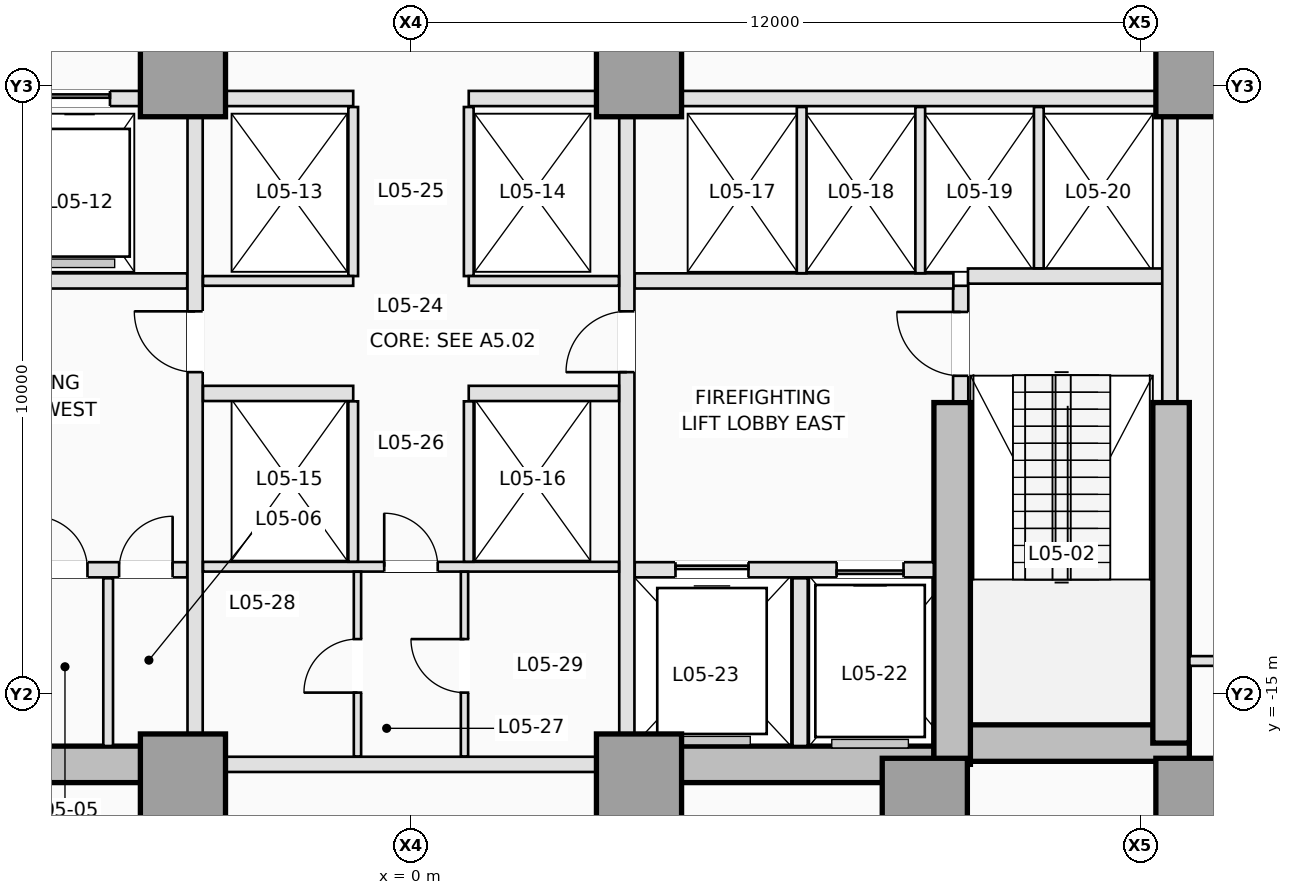
"""IFC4 building model, lengths in metres.
Left out: names, types, materials, properties, quantities, classifications, styles, units other than length and angle.
Written with IfcOpenShell. Run it as: python <this file> out.ifc"""

import sys

from ifc_helpers import new_model, si_unit, direction, frame, frame_2d, origin, origin_2d, place, context, subcontext, project, spatial, rectangle, extrude, element, fill, save


model = new_model("IFC4")
c1 = context("Model", 3, precision=1e-05, world=origin(), true_north=direction((0.0, 1.0)))
c2 = subcontext(c1, "Body", "Model", "MODEL_VIEW")
j1 = project(units=[si_unit("LENGTHUNIT", "METRE"), si_unit("PLANEANGLEUNIT", "RADIAN")], contexts=[c1])
p1 = place(None, origin())
s1 = spatial("IfcSite", under=j1, at=p1, CompositionType="ELEMENT")
p2 = place(p1, origin())
s2 = spatial("IfcBuilding", under=s1, at=p2, CompositionType="ELEMENT")
p3 = place(p2, frame((0.0, 0.0, 23.0)))
s3 = spatial("IfcBuildingStorey", under=s2, at=p3, CompositionType="ELEMENT", Elevation=23.0)
for number, where, z_axis, x_axis in (
    (1, (-8.9, -16.15, 0.0), (0.0, 0.0, 1.0), (1.0, 0.0, 0.0)),
    (2, (3.75, -16.15, 0.0), (0.0, 0.0, 1.0), (1.0, 0.0, 0.0)),
):
    element("IfcWall", number, at=place(p3, frame(where, z_axis=z_axis, x_axis=x_axis)), inside=s3, PredefinedType="SHEAR", context=c2, shape_type="SweptSolid", body=[
        extrude(rectangle(XDim=5.15, YDim=0.6, at=frame_2d((2.575, 0.0))), origin(), (0.0, 0.0, 1.0), 4.6),
    ])
p4 = place(p3, frame((8.6, -15.8, 0.0), z_axis=(0.0, 0.0, 1.0), x_axis=(1.0, 0.0, 0.0)))
e3 = element("IfcWall", 3, at=p4, inside=s3, PredefinedType="SHEAR", context=c2, shape_type="SweptSolid", body=[
    extrude(rectangle(XDim=4.2, YDim=0.6, at=frame_2d((2.1, 0.0))), origin(), (0.0, 0.0, 1.0), 4.6),
])
p5 = place(p3, frame((12.5, -15.8, 0.0), z_axis=(0.0, 0.0, 1.0), x_axis=(0.0, 1.0, 0.0)))
e4 = element("IfcWall", 4, at=p5, inside=s3, PredefinedType="SHEAR", context=c2, shape_type="SweptSolid", body=[
    extrude(rectangle(XDim=5.6, YDim=0.6, at=frame_2d((2.8, 0.0))), origin(), (0.0, 0.0, 1.0), 4.6),
])
p6 = place(p3, frame((8.9, -16.15, 0.0), z_axis=(0.0, 0.0, 1.0), x_axis=(0.0, 1.0, 0.0)))
e5 = element("IfcWall", 5, at=p6, inside=s3, PredefinedType="SHEAR", context=c2, shape_type="SweptSolid", body=[
    extrude(rectangle(XDim=5.95, YDim=0.6, at=frame_2d((2.975, 0.0))), origin(), (0.0, 0.0, 1.0), 4.6),
])
for number, where, z_axis, x_axis in (
    (6, (-3.75, -16.35, 0.0), (0.0, 0.0, 1.0), (1.0, 0.0, 0.0)),
    (7, (3.75, -16.35, 0.0), (0.0, 0.0, 1.0), (1.0, 0.0, 0.0)),
    (8, (8.45, -16.75, 0.0), (0.0, 0.0, 1.0), (1.0, 0.0, 0.0)),
    (9, (12.95, -16.75, 0.0), (0.0, 0.0, 1.0), (1.0, 0.0, 0.0)),
    (10, (-3.75, -4.8, 0.0), (0.0, 0.0, 1.0), (1.0, 0.0, 0.0)),
    (11, (3.75, -4.8, 0.0), (0.0, 0.0, 1.0), (1.0, 0.0, 0.0)),
    (12, (12.95, -4.8, 0.0), (0.0, 0.0, 1.0), (1.0, 0.0, 0.0)),
):
    element("IfcColumn", number, at=place(p3, frame(where, z_axis=z_axis, x_axis=x_axis)), inside=s3, PredefinedType="COLUMN", context=c2, shape_type="SweptSolid", body=[
        extrude(rectangle(XDim=1.4, YDim=1.4, at=origin_2d()), origin(), (0.0, 0.0, 1.0), 4.6),
    ])
p7 = place(p3, frame((9.04, -10.18, 0.0), z_axis=(0.0, 0.0, 1.0), x_axis=(0.0, 1.0, 0.0)))
e13 = element("IfcWall", 13, at=p7, inside=s3, PredefinedType="PARTITIONING", context=c2, shape_type="SweptSolid", body=[
    extrude(rectangle(XDim=1.9, YDim=0.25, at=frame_2d((0.95, 0.0))), origin(), (0.0, 0.0, 1.0), 4.35),
])
p8 = place(p7, frame((0.42, 0.0, 0.0)))
e14 = element("IfcOpeningElement", 14, at=p8, cuts=e13, PredefinedType="OPENING", context=c2, shape_type="SweptSolid", body=[
    extrude(rectangle(XDim=1.05, YDim=2.15, at=frame_2d((0.525, 1.075))), frame((0.0, 0.135, 0.0), z_axis=(0.0, -1.0, 0.0), x_axis=(1.0, 0.0, 0.0)), (0.0, 0.0, 1.0), 0.27),
])
p9 = place(p3, frame((9.16, -8.12, 0.0), z_axis=(0.0, 0.0, 1.0), x_axis=(1.0, 0.0, 0.0)))
e15 = element("IfcWall", 15, at=p9, inside=s3, PredefinedType="PARTITIONING", context=c2, shape_type="SweptSolid", body=[
    extrude(rectangle(XDim=3.22, YDim=0.25, at=frame_2d((1.61, 0.0))), origin(), (0.0, 0.0, 1.0), 4.35),
])
p10 = place(p3, frame((12.48, -10.18, 0.0), z_axis=(0.0, 0.0, 1.0), x_axis=(0.0, 1.0, 0.0)))
e16 = element("IfcWall", 16, at=p10, inside=s3, PredefinedType="PARTITIONING", context=c2, shape_type="SweptSolid", body=[
    extrude(rectangle(XDim=4.678, YDim=0.25, at=frame_2d((2.339, 0.0))), origin(), (0.0, 0.0, 1.0), 4.35),
])
p11 = place(p3, frame((-8.598, -12.95, 0.0), z_axis=(0.0, 0.0, 1.0), x_axis=(1.0, 0.0, 0.0)))
e17 = element("IfcWall", 17, at=p11, inside=s3, PredefinedType="PARTITIONING", context=c2, shape_type="SweptSolid", body=[
    extrude(rectangle(XDim=4.918, YDim=0.25, at=frame_2d((2.459, 0.0))), origin(), (0.0, 0.0, 1.0), 4.35),
])
p12 = place(p11, frame((0.498, 0.0, 0.0)))
e18 = element("IfcOpeningElement", 18, at=p12, cuts=e17, PredefinedType="OPENING", context=c2, shape_type="SweptSolid", body=[
    extrude(rectangle(XDim=1.1, YDim=2.15, at=frame_2d((0.55, 1.075))), frame((0.0, 0.135, 0.0), z_axis=(0.0, -1.0, 0.0), x_axis=(1.0, 0.0, 0.0)), (0.0, 0.0, 1.0), 0.27),
])
p13 = place(p11, frame((2.398, 0.0, 0.0)))
e19 = element("IfcOpeningElement", 19, at=p13, cuts=e17, PredefinedType="OPENING", context=c2, shape_type="SweptSolid", body=[
    extrude(rectangle(XDim=0.88, YDim=2.1, at=frame_2d((0.44, 1.05))), frame((0.0, 0.135, 0.0), z_axis=(0.0, -1.0, 0.0), x_axis=(1.0, 0.0, 0.0)), (0.0, 0.0, 1.0), 0.27),
])
p14 = place(p11, frame((3.798, 0.0, 0.0)))
e20 = element("IfcOpeningElement", 20, at=p14, cuts=e17, PredefinedType="OPENING", context=c2, shape_type="SweptSolid", body=[
    extrude(rectangle(XDim=0.88, YDim=2.1, at=frame_2d((0.44, 1.05))), frame((0.0, 0.135, 0.0), z_axis=(0.0, -1.0, 0.0), x_axis=(1.0, 0.0, 0.0)), (0.0, 0.0, 1.0), 0.27),
])
p15 = place(p3, frame((3.68, -12.95, 0.0), z_axis=(0.0, 0.0, 1.0), x_axis=(1.0, 0.0, 0.0)))
e21 = element("IfcWall", 21, at=p15, inside=s3, PredefinedType="PARTITIONING", context=c2, shape_type="SweptSolid", body=[
    extrude(rectangle(XDim=4.918, YDim=0.25, at=frame_2d((2.459, 0.0))), origin(), (0.0, 0.0, 1.0), 4.35),
])
p16 = place(p15, frame((3.32, 0.0, 0.0)))
e22 = element("IfcOpeningElement", 22, at=p16, cuts=e21, PredefinedType="OPENING", context=c2, shape_type="SweptSolid", body=[
    extrude(rectangle(XDim=1.1, YDim=2.15, at=frame_2d((0.55, 1.075))), frame((0.0, 0.135, 0.0), z_axis=(0.0, -1.0, 0.0), x_axis=(1.0, 0.0, 0.0)), (0.0, 0.0, 1.0), 0.27),
])
p17 = place(p15, frame((0.67, 0.0, 0.0)))
e23 = element("IfcOpeningElement", 23, at=p17, cuts=e21, PredefinedType="OPENING", context=c2, shape_type="SweptSolid", body=[
    extrude(rectangle(XDim=1.2, YDim=2.15, at=frame_2d((0.6, 1.075))), frame((0.0, 0.135, 0.0), z_axis=(0.0, -1.0, 0.0), x_axis=(1.0, 0.0, 0.0)), (0.0, 0.0, 1.0), 0.27),
])
p18 = place(p3, frame((-4.98, -15.848, 0.0), z_axis=(0.0, 0.0, 1.0), x_axis=(0.0, 1.0, 0.0)))
e24 = element("IfcWall", 24, at=p18, inside=s3, PredefinedType="PARTITIONING", context=c2, shape_type="SweptSolid", body=[
    extrude(rectangle(XDim=2.758, YDim=0.16, at=frame_2d((1.379, 0.0))), origin(), (0.0, 0.0, 1.0), 4.35),
])
p19 = place(p3, frame((6.4, -15.848, 0.0), z_axis=(0.0, 0.0, 1.0), x_axis=(0.0, 1.0, 0.0)))
e25 = element("IfcWall", 25, at=p19, inside=s3, PredefinedType="PARTITIONING", context=c2, shape_type="SweptSolid", body=[
    extrude(rectangle(XDim=2.758, YDim=0.25, at=frame_2d((1.379, 0.0))), origin(), (0.0, 0.0, 1.0), 4.35),
])
for number, where, z_axis, x_axis in (
    (26, (-8.92, -8.2, 0.0), (0.0, 0.0, 1.0), (1.0, 0.0, 0.0)),
    (27, (3.68, -8.2, 0.0), (0.0, 0.0, 1.0), (1.0, 0.0, 0.0)),
):
    element("IfcWall", number, at=place(p3, frame(where, z_axis=z_axis, x_axis=x_axis)), inside=s3, PredefinedType="PARTITIONING", context=c2, shape_type="SweptSolid", body=[
        extrude(rectangle(XDim=5.24, YDim=0.25, at=frame_2d((2.62, 0.0))), origin(), (0.0, 0.0, 1.0), 4.35),
    ])
p20 = place(p3, frame((-3.55, -15.648, 0.0), z_axis=(0.0, 0.0, 1.0), x_axis=(0.0, 1.0, 0.0)))
e28 = element("IfcWall", 28, at=p20, inside=s3, PredefinedType="PARTITIONING", context=c2, shape_type="SweptSolid", body=[
    extrude(rectangle(XDim=10.146, YDim=0.25, at=frame_2d((5.073, 0.0))), origin(), (0.0, 0.0, 1.0), 4.35),
])
p21 = place(p20, frame((5.948, 0.0, 0.0)))
e29 = element("IfcOpeningElement", 29, at=p21, cuts=e28, PredefinedType="OPENING", context=c2, shape_type="SweptSolid", body=[
    extrude(rectangle(XDim=1.0, YDim=2.15, at=frame_2d((0.5, 1.075))), frame((0.0, 0.135, 0.0), z_axis=(0.0, -1.0, 0.0), x_axis=(1.0, 0.0, 0.0)), (0.0, 0.0, 1.0), 0.27),
])
p22 = place(p3, frame((3.55, -15.648, 0.0), z_axis=(0.0, 0.0, 1.0), x_axis=(0.0, 1.0, 0.0)))
e30 = element("IfcWall", 30, at=p22, inside=s3, PredefinedType="PARTITIONING", context=c2, shape_type="SweptSolid", body=[
    extrude(rectangle(XDim=10.146, YDim=0.25, at=frame_2d((5.073, 0.0))), origin(), (0.0, 0.0, 1.0), 4.35),
])
p23 = place(p22, frame((5.948, 0.0, 0.0)))
e31 = element("IfcOpeningElement", 31, at=p23, cuts=e30, PredefinedType="OPENING", context=c2, shape_type="SweptSolid", body=[
    extrude(rectangle(XDim=1.0, YDim=2.15, at=frame_2d((0.5, 1.075))), frame((0.0, 0.135, 0.0), z_axis=(0.0, -1.0, 0.0), x_axis=(1.0, 0.0, 0.0)), (0.0, 0.0, 1.0), 0.27),
])
p24 = place(p3, frame((-12.248, -5.2, 0.0), z_axis=(0.0, 0.0, 1.0), x_axis=(1.0, 0.0, 0.0)))
e32 = element("IfcWall", 32, at=p24, inside=s3, PredefinedType="PARTITIONING", context=c2, shape_type="SweptSolid", body=[
    extrude(rectangle(XDim=7.796, YDim=0.25, at=frame_2d((3.898, 0.0))), origin(), (0.0, 0.0, 1.0), 2.55),
])
p25 = place(p24, frame((0.448, 0.0, 0.0)))
e33 = element("IfcOpeningElement", 33, at=p25, cuts=e32, PredefinedType="OPENING", context=c2, shape_type="SweptSolid", body=[
    extrude(rectangle(XDim=1.0, YDim=2.15, at=frame_2d((0.5, 1.075))), frame((0.0, 0.135, 0.0), z_axis=(0.0, -1.0, 0.0), x_axis=(1.0, 0.0, 0.0)), (0.0, 0.0, 1.0), 0.27),
])
p26 = place(p24, frame((2.398, 0.0, 0.0)))
e34 = element("IfcOpeningElement", 34, at=p26, cuts=e32, PredefinedType="OPENING", context=c2, shape_type="SweptSolid", body=[
    extrude(rectangle(XDim=1.0, YDim=2.15, at=frame_2d((0.5, 1.075))), frame((0.0, 0.135, 0.0), z_axis=(0.0, -1.0, 0.0), x_axis=(1.0, 0.0, 0.0)), (0.0, 0.0, 1.0), 0.27),
])
p27 = place(p24, frame((4.348, 0.0, 0.0)))
e35 = element("IfcOpeningElement", 35, at=p27, cuts=e32, PredefinedType="OPENING", context=c2, shape_type="SweptSolid", body=[
    extrude(rectangle(XDim=1.0, YDim=2.15, at=frame_2d((0.5, 1.075))), frame((0.0, 0.135, 0.0), z_axis=(0.0, -1.0, 0.0), x_axis=(1.0, 0.0, 0.0)), (0.0, 0.0, 1.0), 0.27),
])
p28 = place(p24, frame((6.298, 0.0, 0.0)))
e36 = element("IfcOpeningElement", 36, at=p28, cuts=e32, PredefinedType="OPENING", context=c2, shape_type="SweptSolid", body=[
    extrude(rectangle(XDim=1.0, YDim=2.15, at=frame_2d((0.5, 1.075))), frame((0.0, 0.135, 0.0), z_axis=(0.0, -1.0, 0.0), x_axis=(1.0, 0.0, 0.0)), (0.0, 0.0, 1.0), 0.27),
])
p29 = place(p3, frame((4.452, -5.2, 0.0), z_axis=(0.0, 0.0, 1.0), x_axis=(1.0, 0.0, 0.0)))
e37 = element("IfcWall", 37, at=p29, inside=s3, PredefinedType="PARTITIONING", context=c2, shape_type="SweptSolid", body=[
    extrude(rectangle(XDim=7.796, YDim=0.25, at=frame_2d((3.898, 0.0))), origin(), (0.0, 0.0, 1.0), 2.55),
])
for number, where, z_axis, x_axis in (
    (38, (-3.048, -5.2, 0.0), (0.0, 0.0, 1.0), (1.0, 0.0, 0.0)),
    (39, (0.95, -5.2, 0.0), (0.0, 0.0, 1.0), (1.0, 0.0, 0.0)),
):
    element("IfcWall", number, at=place(p3, frame(where, z_axis=z_axis, x_axis=x_axis)), inside=s3, PredefinedType="PARTITIONING", context=c2, shape_type="SweptSolid", body=[
        extrude(rectangle(XDim=2.098, YDim=0.25, at=frame_2d((1.049, 0.0))), origin(), (0.0, 0.0, 1.0), 2.55),
    ])
for number, where, z_axis, x_axis in (
    (40, (6.425, -8.073, 0.0), (0.0, 0.0, 1.0), (0.0, 1.0, 0.0)),
    (41, (8.375, -8.073, 0.0), (0.0, 0.0, 1.0), (0.0, 1.0, 0.0)),
):
    element("IfcWall", number, at=place(p3, frame(where, z_axis=z_axis, x_axis=x_axis)), inside=s3, PredefinedType="PARTITIONING", context=c2, shape_type="SweptSolid", body=[
        extrude(rectangle(XDim=2.733, YDim=0.16, at=frame_2d((1.366, 0.0))), origin(), (0.0, 0.0, 1.0), 4.35),
    ])
p30 = place(p3, frame((10.325, -7.993, 0.0), z_axis=(0.0, 0.0, 1.0), x_axis=(0.0, 1.0, 0.0)))
e42 = element("IfcWall", 42, at=p30, inside=s3, PredefinedType="PARTITIONING", context=c2, shape_type="SweptSolid", body=[
    extrude(rectangle(XDim=2.653, YDim=0.16, at=frame_2d((1.326, 0.0))), origin(), (0.0, 0.0, 1.0), 4.35),
])
p31 = place(p3, frame((-3.048, -16.15, 0.0), z_axis=(0.0, 0.0, 1.0), x_axis=(1.0, 0.0, 0.0)))
e43 = element("IfcWall", 43, at=p31, inside=s3, PredefinedType="PARTITIONING", context=c2, shape_type="SweptSolid", body=[
    extrude(rectangle(XDim=6.096, YDim=0.25, at=frame_2d((3.048, 0.0))), origin(), (0.0, 0.0, 1.0), 2.55),
])
for number, where, z_axis, x_axis in (
    (44, (-0.95, -8.12, 0.0), (0.0, 0.0, 1.0), (0.0, 1.0, 0.0)),
    (45, (0.95, -8.12, 0.0), (0.0, 0.0, 1.0), (0.0, 1.0, 0.0)),
):
    element("IfcWall", number, at=place(p3, frame(where, z_axis=z_axis, x_axis=x_axis)), inside=s3, PredefinedType="PARTITIONING", context=c2, shape_type="SweptSolid", body=[
        extrude(rectangle(XDim=2.78, YDim=0.16, at=frame_2d((1.39, 0.0))), origin(), (0.0, 0.0, 1.0), 4.35),
    ])
for number, where, z_axis, x_axis in (
    (46, (-3.42, -8.2, 0.0), (0.0, 0.0, 1.0), (1.0, 0.0, 0.0)),
    (47, (0.95, -8.2, 0.0), (0.0, 0.0, 1.0), (1.0, 0.0, 0.0)),
):
    element("IfcWall", number, at=place(p3, frame(where, z_axis=z_axis, x_axis=x_axis)), inside=s3, PredefinedType="PARTITIONING", context=c2, shape_type="SweptSolid", body=[
        extrude(rectangle(XDim=2.47, YDim=0.16, at=frame_2d((1.235, 0.0))), origin(), (0.0, 0.0, 1.0), 4.35),
    ])
for number, where, z_axis, x_axis in (
    (48, (-3.42, -10.05, 0.0), (0.0, 0.0, 1.0), (1.0, 0.0, 0.0)),
    (49, (0.95, -10.05, 0.0), (0.0, 0.0, 1.0), (1.0, 0.0, 0.0)),
):
    element("IfcWall", number, at=place(p3, frame(where, z_axis=z_axis, x_axis=x_axis)), inside=s3, PredefinedType="PARTITIONING", context=c2, shape_type="SweptSolid", body=[
        extrude(rectangle(XDim=2.47, YDim=0.25, at=frame_2d((1.235, 0.0))), origin(), (0.0, 0.0, 1.0), 4.35),
    ])
p32 = place(p3, frame((-3.42, -12.9, 0.0), z_axis=(0.0, 0.0, 1.0), x_axis=(1.0, 0.0, 0.0)))
e50 = element("IfcWall", 50, at=p32, inside=s3, PredefinedType="PARTITIONING", context=c2, shape_type="SweptSolid", body=[
    extrude(rectangle(XDim=6.84, YDim=0.16, at=frame_2d((3.42, 0.0))), origin(), (0.0, 0.0, 1.0), 4.35),
])
p33 = place(p32, frame((2.98, 0.0, 0.0)))
e51 = element("IfcOpeningElement", 51, at=p33, cuts=e50, PredefinedType="OPENING", context=c2, shape_type="SweptSolid", body=[
    extrude(rectangle(XDim=0.88, YDim=2.12, at=frame_2d((0.44, 1.06))), frame((0.0, 0.09, 0.0), z_axis=(0.0, -1.0, 0.0), x_axis=(1.0, 0.0, 0.0)), (0.0, 0.0, 1.0), 0.18),
])
for number, where, z_axis, x_axis in (
    (52, (-0.95, -12.818, 0.0), (0.0, 0.0, 1.0), (0.0, 1.0, 0.0)),
    (53, (0.95, -12.818, 0.0), (0.0, 0.0, 1.0), (0.0, 1.0, 0.0)),
):
    element("IfcWall", number, at=place(p3, frame(where, z_axis=z_axis, x_axis=x_axis)), inside=s3, PredefinedType="PARTITIONING", context=c2, shape_type="SweptSolid", body=[
        extrude(rectangle(XDim=2.638, YDim=0.16, at=frame_2d((1.319, 0.0))), origin(), (0.0, 0.0, 1.0), 4.35),
    ])
p34 = place(p3, frame((-0.88, -16.02, 0.0), z_axis=(0.0, 0.0, 1.0), x_axis=(0.0, 1.0, 0.0)))
e54 = element("IfcWall", 54, at=p34, inside=s3, PredefinedType="PARTITIONING", context=c2, shape_type="SweptSolid", body=[
    extrude(rectangle(XDim=3.038, YDim=0.12, at=frame_2d((1.519, 0.0))), origin(), (0.0, 0.0, 1.0), 4.35),
])
p35 = place(p34, frame((1.05, 0.0, 0.0)))
e55 = element("IfcOpeningElement", 55, at=p35, cuts=e54, PredefinedType="OPENING", context=c2, shape_type="SweptSolid", body=[
    extrude(rectangle(XDim=0.88, YDim=2.12, at=frame_2d((0.44, 1.06))), frame((0.0, 0.07, 0.0), z_axis=(0.0, -1.0, 0.0), x_axis=(1.0, 0.0, 0.0)), (0.0, 0.0, 1.0), 0.14),
])
p36 = place(p3, frame((0.88, -16.02, 0.0), z_axis=(0.0, 0.0, 1.0), x_axis=(0.0, 1.0, 0.0)))
e56 = element("IfcWall", 56, at=p36, inside=s3, PredefinedType="PARTITIONING", context=c2, shape_type="SweptSolid", body=[
    extrude(rectangle(XDim=3.038, YDim=0.12, at=frame_2d((1.519, 0.0))), origin(), (0.0, 0.0, 1.0), 4.35),
])
p37 = place(p36, frame((1.05, 0.0, 0.0)))
e57 = element("IfcOpeningElement", 57, at=p37, cuts=e56, PredefinedType="OPENING", context=c2, shape_type="SweptSolid", body=[
    extrude(rectangle(XDim=0.88, YDim=2.12, at=frame_2d((0.44, 1.06))), frame((0.0, 0.07, 0.0), z_axis=(0.0, -1.0, 0.0), x_axis=(1.0, 0.0, 0.0)), (0.0, 0.0, 1.0), 0.14),
])
p38 = place(p3, frame((12.802, -14.45, 0.0), z_axis=(0.0, 0.0, 1.0), x_axis=(1.0, 0.0, 0.0)))
e58 = element("IfcWall", 58, at=p38, inside=s3, PredefinedType="PARTITIONING", context=c2, shape_type="SweptSolid", body=[
    extrude(rectangle(XDim=8.966, YDim=0.16, at=frame_2d((4.483, 0.0))), origin(), (0.0, 0.0, 1.0), 4.35),
])
p39 = place(p28, origin())
e59 = element("IfcDoor", 59, at=p39, inside=s3, OperationType="SLIDING_TO_LEFT", PredefinedType="DOOR", context=c2, shape_type="SweptSolid", body=[
    extrude(rectangle(XDim=1.0, YDim=2.15, at=frame_2d((0.5, 1.075))), frame((0.0, 0.025, 0.0), z_axis=(0.0, -1.0, 0.0), x_axis=(1.0, 0.0, 0.0)), (0.0, 0.0, 1.0), 0.05),
])
fill(e36, e59)
p40 = place(p16, origin())
e60 = element("IfcDoor", 60, at=p40, inside=s3, OperationType="SLIDING_TO_RIGHT", PredefinedType="DOOR", context=c2, shape_type="SweptSolid", body=[
    extrude(rectangle(XDim=1.1, YDim=2.15, at=frame_2d((0.55, 1.075))), frame((0.0, 0.025, 0.0), z_axis=(0.0, -1.0, 0.0), x_axis=(1.0, 0.0, 0.0)), (0.0, 0.0, 1.0), 0.05),
])
fill(e22, e60)
p41 = place(p17, origin())
e61 = element("IfcDoor", 61, at=p41, inside=s3, OperationType="SLIDING_TO_LEFT", PredefinedType="DOOR", context=c2, shape_type="SweptSolid", body=[
    extrude(rectangle(XDim=1.2, YDim=2.15, at=frame_2d((0.6, 1.075))), frame((0.0, 0.025, 0.0), z_axis=(0.0, -1.0, 0.0), x_axis=(1.0, 0.0, 0.0)), (0.0, 0.0, 1.0), 0.05),
])
fill(e23, e61)
p42 = place(p8, origin())
e62 = element("IfcDoor", 62, at=p42, inside=s3, OperationType="SINGLE_SWING_RIGHT", PredefinedType="DOOR", context=c2, shape_type="SweptSolid", body=[
    extrude(rectangle(XDim=1.05, YDim=2.15, at=frame_2d((0.525, 1.075))), frame((0.0, 0.025, 0.0), z_axis=(0.0, -1.0, 0.0), x_axis=(1.0, 0.0, 0.0)), (0.0, 0.0, 1.0), 0.05),
])
fill(e14, e62)
p43 = place(p13, origin())
e63 = element("IfcDoor", 63, at=p43, inside=s3, OperationType="SINGLE_SWING_LEFT", PredefinedType="TRAPDOOR", context=c2, shape_type="SweptSolid", body=[
    extrude(rectangle(XDim=0.88, YDim=2.1, at=frame_2d((0.44, 1.05))), frame((0.0, 0.025, 0.0), z_axis=(0.0, -1.0, 0.0), x_axis=(1.0, 0.0, 0.0)), (0.0, 0.0, 1.0), 0.05),
])
fill(e19, e63)
p44 = place(p14, origin())
e64 = element("IfcDoor", 64, at=p44, inside=s3, OperationType="SINGLE_SWING_RIGHT", PredefinedType="TRAPDOOR", context=c2, shape_type="SweptSolid", body=[
    extrude(rectangle(XDim=0.88, YDim=2.1, at=frame_2d((0.44, 1.05))), frame((0.0, 0.025, 0.0), z_axis=(0.0, -1.0, 0.0), x_axis=(1.0, 0.0, 0.0)), (0.0, 0.0, 1.0), 0.05),
])
fill(e20, e64)
p45 = place(p21, origin())
e65 = element("IfcDoor", 65, at=p45, inside=s3, OperationType="SINGLE_SWING_RIGHT", PredefinedType="DOOR", context=c2, shape_type="SweptSolid", body=[
    extrude(rectangle(XDim=1.0, YDim=2.15, at=frame_2d((0.5, 1.075))), frame((0.0, 0.025, 0.0), z_axis=(0.0, -1.0, 0.0), x_axis=(1.0, 0.0, 0.0)), (0.0, 0.0, 1.0), 0.05),
])
fill(e29, e65)
p46 = place(p23, origin())
e66 = element("IfcDoor", 66, at=p46, inside=s3, OperationType="SINGLE_SWING_LEFT", PredefinedType="DOOR", context=c2, shape_type="SweptSolid", body=[
    extrude(rectangle(XDim=1.0, YDim=2.15, at=frame_2d((0.5, 1.075))), frame((0.0, 0.025, 0.0), z_axis=(0.0, -1.0, 0.0), x_axis=(1.0, 0.0, 0.0)), (0.0, 0.0, 1.0), 0.05),
])
fill(e31, e66)
p47 = place(p33, origin())
e67 = element("IfcDoor", 67, at=p47, inside=s3, OperationType="SINGLE_SWING_LEFT", PredefinedType="DOOR", context=c2, shape_type="SweptSolid", body=[
    extrude(rectangle(XDim=0.88, YDim=2.12, at=frame_2d((0.44, 1.06))), frame((0.0, 0.025, 0.0), z_axis=(0.0, -1.0, 0.0), x_axis=(1.0, 0.0, 0.0)), (0.0, 0.0, 1.0), 0.05),
])
fill(e51, e67)
p48 = place(p35, origin())
e68 = element("IfcDoor", 68, at=p48, inside=s3, OperationType="SINGLE_SWING_LEFT", PredefinedType="DOOR", context=c2, shape_type="SweptSolid", body=[
    extrude(rectangle(XDim=0.88, YDim=2.12, at=frame_2d((0.44, 1.06))), frame((0.0, 0.025, 0.0), z_axis=(0.0, -1.0, 0.0), x_axis=(1.0, 0.0, 0.0)), (0.0, 0.0, 1.0), 0.05),
])
fill(e55, e68)
p49 = place(p37, origin())
e69 = element("IfcDoor", 69, at=p49, inside=s3, OperationType="SINGLE_SWING_RIGHT", PredefinedType="DOOR", context=c2, shape_type="SweptSolid", body=[
    extrude(rectangle(XDim=0.88, YDim=2.12, at=frame_2d((0.44, 1.06))), frame((0.0, 0.025, 0.0), z_axis=(0.0, -1.0, 0.0), x_axis=(1.0, 0.0, 0.0)), (0.0, 0.0, 1.0), 0.05),
])
fill(e57, e69)
save(model, sys.argv[1])
